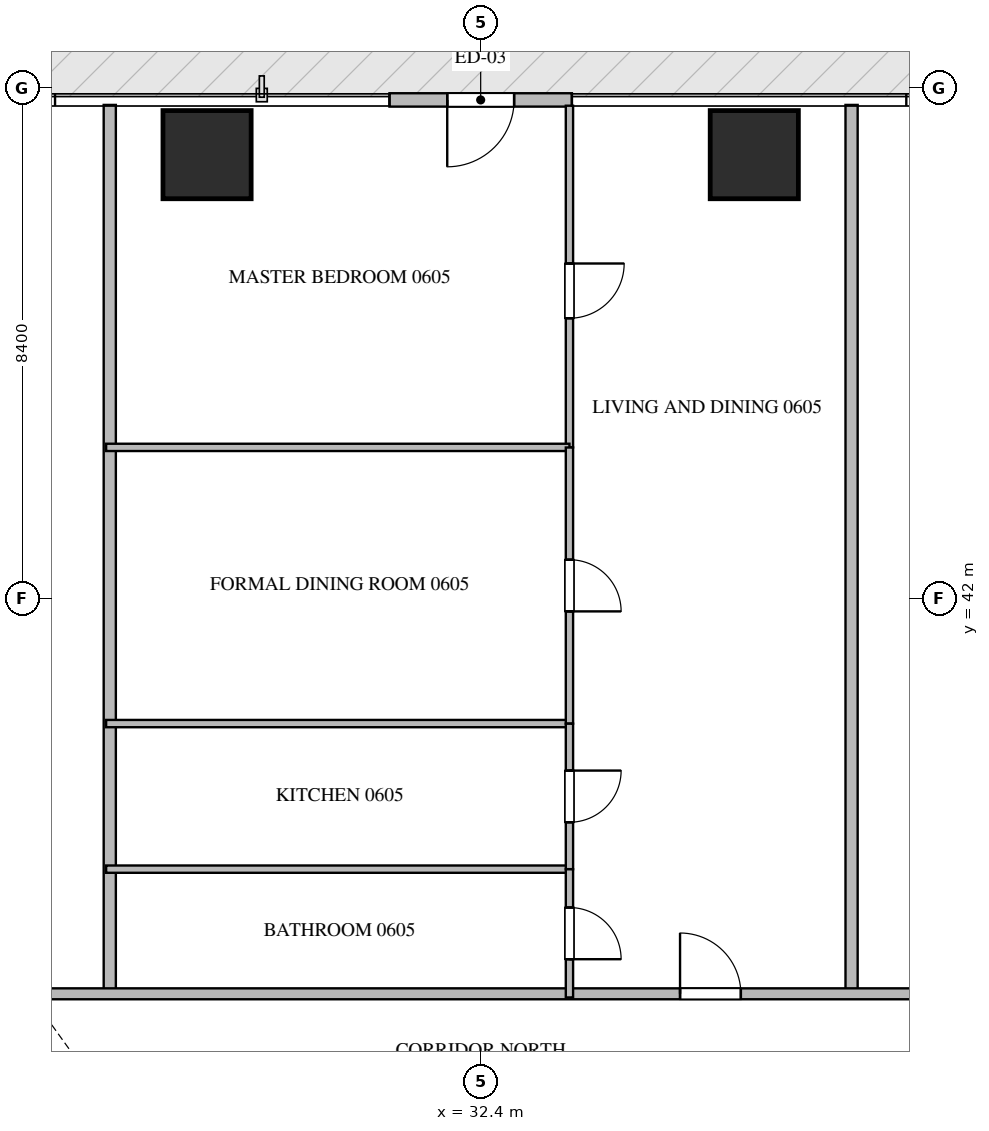
"""IFC4 building model, lengths in metres.
Left out: names, types, materials, properties, quantities, classifications, styles, units other than length and angle.
Written with IfcOpenShell. Run it as: python <this file> out.ifc"""

import sys

from ifc_helpers import new_model, si_unit, direction, frame, frame_2d, origin, origin_2d, place, context, subcontext, project, spatial, rectangle, extrude, source, transform, mapped, element, fill, save


model = new_model("IFC4")
c1 = context("Model", 3, precision=1e-05, world=origin(), true_north=direction((0.0, 1.0)))
c2 = subcontext(c1, "Body", "Model", "MODEL_VIEW")
j1 = project(units=[si_unit("LENGTHUNIT", "METRE"), si_unit("PLANEANGLEUNIT", "RADIAN")], contexts=[c1])
p1 = place(None, origin())
s1 = spatial("IfcSite", under=j1, at=p1, CompositionType="ELEMENT")
p2 = place(p1, origin())
s2 = spatial("IfcBuilding", under=s1, at=p2, CompositionType="ELEMENT")
p3 = place(p2, frame((0.0, 0.0, 30.45)))
s3 = spatial("IfcBuildingStorey", under=s2, at=p3, CompositionType="ELEMENT", Elevation=30.45)
m1 = source(origin(), c2, "Body", "SweptSolid", [
    extrude(rectangle(XDim=1.45, YDim=1.45, at=origin_2d()), origin(), (0.0, 0.0, 1.0), 3.75),
])
for number, where, z_axis, x_axis in (
    (1, (27.9, 49.3, -0.26), (0.0, 0.0, 1.0), (1.0, 0.0, 0.0)),
    (2, (36.9, 49.3, -0.26), (0.0, 0.0, 1.0), (1.0, 0.0, 0.0)),
):
    element("IfcColumn", number, at=place(p3, frame(where, z_axis=z_axis, x_axis=x_axis)), inside=s3, PredefinedType="COLUMN", context=c2, shape_type="MappedRepresentation", body=[
        mapped(m1, transform((0.0, 0.0, 0.0), scale=1.0)),
    ])
p4 = place(p3, frame((33.9, 50.2, 0.0), z_axis=(0.0, 0.0, 1.0), x_axis=(-1.0, 0.0, 0.0)))
e3 = element("IfcWall", 3, at=p4, inside=s3, PredefinedType="ELEMENTEDWALL", context=c2, shape_type="SweptSolid", body=[
    extrude(rectangle(XDim=3.0, YDim=0.22, at=frame_2d((1.5, 0.0))), origin(), (0.0, 0.0, 1.0), 3.475),
])
p5 = place(p4, frame((0.95, 0.0, 0.0)))
e4 = element("IfcOpeningElement", 4, at=p5, cuts=e3, PredefinedType="OPENING", context=c2, shape_type="SweptSolid", body=[
    extrude(rectangle(XDim=1.1, YDim=2.2, at=frame_2d((0.55, 1.1))), frame((0.0, 0.12, 0.0), z_axis=(0.0, -1.0, 0.0), x_axis=(1.0, 0.0, 0.0)), (0.0, 0.0, 1.0), 0.24),
])
for number, where, z_axis, x_axis in (
    (5, (26.3, 35.5, 0.0), (0.0, 0.0, 1.0), (0.0, 1.0, 0.0)),
    (6, (38.5, 35.5, 0.0), (0.0, 0.0, 1.0), (0.0, 1.0, 0.0)),
):
    element("IfcWall", number, at=place(p3, frame(where, z_axis=z_axis, x_axis=x_axis)), inside=s3, PredefinedType="PARTITIONING", context=c2, shape_type="SweptSolid", body=[
        extrude(rectangle(XDim=14.618, YDim=0.2, at=frame_2d((7.309, 0.0))), origin(), (0.0, 0.0, 1.0), 3.49),
    ])
p6 = place(p3, frame((21.402, 35.5, 0.0), z_axis=(0.0, 0.0, 1.0), x_axis=(1.0, 0.0, 0.0)))
e7 = element("IfcWall", 7, at=p6, inside=s3, PredefinedType="PARTITIONING", context=c2, shape_type="SweptSolid", body=[
    extrude(rectangle(XDim=21.996, YDim=0.18, at=frame_2d((10.998, 0.0))), origin(), (0.0, 0.0, 1.0), 3.49),
])
p7 = place(p6, frame((2.1, 0.0, 0.0)))
e8 = element("IfcOpeningElement", 8, at=p7, cuts=e7, PredefinedType="OPENING", context=c2, shape_type="SweptSolid", body=[
    extrude(rectangle(XDim=1.0, YDim=2.15, at=frame_2d((0.5, 1.075))), frame((0.0, 0.1, 0.0), z_axis=(0.0, -1.0, 0.0), x_axis=(1.0, 0.0, 0.0)), (0.0, 0.0, 1.0), 0.2),
])
p8 = place(p6, frame((14.277, 0.0, 0.0)))
e9 = element("IfcOpeningElement", 9, at=p8, cuts=e7, PredefinedType="OPENING", context=c2, shape_type="SweptSolid", body=[
    extrude(rectangle(XDim=1.0, YDim=2.15, at=frame_2d((0.5, 1.075))), frame((0.0, 0.1, 0.0), z_axis=(0.0, -1.0, 0.0), x_axis=(1.0, 0.0, 0.0)), (0.0, 0.0, 1.0), 0.2),
])
p9 = place(p6, frame((18.896, 0.0, 0.0)))
e10 = element("IfcOpeningElement", 10, at=p9, cuts=e7, PredefinedType="OPENING", context=c2, shape_type="SweptSolid", body=[
    extrude(rectangle(XDim=1.0, YDim=2.15, at=frame_2d((0.5, 1.075))), frame((0.0, 0.1, 0.0), z_axis=(0.0, -1.0, 0.0), x_axis=(1.0, 0.0, 0.0)), (0.0, 0.0, 1.0), 0.2),
])
p10 = place(p3, frame((33.86, 50.105, 0.0), z_axis=(0.0, 0.0, 1.0), x_axis=(0.0, -1.0, 0.0)))
e11 = element("IfcWall", 11, at=p10, inside=s3, PredefinedType="PARTITIONING", context=c2, shape_type="SweptSolid", body=[
    extrude(rectangle(XDim=5.619, YDim=0.12, at=frame_2d((2.81, 0.0))), origin(), (0.0, 0.0, 1.0), 3.49),
])
p11 = place(p10, frame((2.595, 0.0, 0.0)))
e12 = element("IfcOpeningElement", 12, at=p11, cuts=e11, PredefinedType="OPENING", context=c2, shape_type="SweptSolid", body=[
    extrude(rectangle(XDim=0.9, YDim=2.1, at=frame_2d((0.45, 1.05))), frame((0.0, 0.07, 0.0), z_axis=(0.0, -1.0, 0.0), x_axis=(1.0, 0.0, 0.0)), (0.0, 0.0, 1.0), 0.14),
])
for number, where, z_axis, x_axis in (
    (13, (26.24, 44.486, 0.0), (0.0, 0.0, 1.0), (1.0, 0.0, 0.0)),
    (14, (26.24, 39.944, 0.0), (0.0, 0.0, 1.0), (1.0, 0.0, 0.0)),
    (15, (26.24, 37.55, 0.0), (0.0, 0.0, 1.0), (1.0, 0.0, 0.0)),
):
    element("IfcWall", number, at=place(p3, frame(where, z_axis=z_axis, x_axis=x_axis)), inside=s3, PredefinedType="PARTITIONING", context=c2, shape_type="SweptSolid", body=[
        extrude(rectangle(XDim=7.62, YDim=0.12, at=frame_2d((3.81, 0.0))), origin(), (0.0, 0.0, 1.0), 3.49),
    ])
p12 = place(p3, frame((33.86, 44.484, 0.0), z_axis=(0.0, 0.0, 1.0), x_axis=(0.0, -1.0, 0.0)))
e16 = element("IfcWall", 16, at=p12, inside=s3, PredefinedType="PARTITIONING", context=c2, shape_type="SweptSolid", body=[
    extrude(rectangle(XDim=4.54, YDim=0.12, at=frame_2d((2.27, 0.0))), origin(), (0.0, 0.0, 1.0), 3.49),
])
p13 = place(p12, frame((1.845, 0.0, 0.0)))
e17 = element("IfcOpeningElement", 17, at=p13, cuts=e16, PredefinedType="OPENING", context=c2, shape_type="SweptSolid", body=[
    extrude(rectangle(XDim=0.85, YDim=2.1, at=frame_2d((0.425, 1.05))), frame((0.0, 0.07, 0.0), z_axis=(0.0, -1.0, 0.0), x_axis=(1.0, 0.0, 0.0)), (0.0, 0.0, 1.0), 0.14),
])
p14 = place(p3, frame((33.86, 39.942, 0.0), z_axis=(0.0, 0.0, 1.0), x_axis=(0.0, -1.0, 0.0)))
e18 = element("IfcWall", 18, at=p14, inside=s3, PredefinedType="PARTITIONING", context=c2, shape_type="SweptSolid", body=[
    extrude(rectangle(XDim=2.392, YDim=0.12, at=frame_2d((1.196, 0.0))), origin(), (0.0, 0.0, 1.0), 3.49),
])
p15 = place(p14, frame((0.771, 0.0, 0.0)))
e19 = element("IfcOpeningElement", 19, at=p15, cuts=e18, PredefinedType="OPENING", context=c2, shape_type="SweptSolid", body=[
    extrude(rectangle(XDim=0.85, YDim=2.1, at=frame_2d((0.425, 1.05))), frame((0.0, 0.07, 0.0), z_axis=(0.0, -1.0, 0.0), x_axis=(1.0, 0.0, 0.0)), (0.0, 0.0, 1.0), 0.14),
])
p16 = place(p3, frame((33.86, 37.548, 0.0), z_axis=(0.0, 0.0, 1.0), x_axis=(0.0, -1.0, 0.0)))
e20 = element("IfcWall", 20, at=p16, inside=s3, PredefinedType="PARTITIONING", context=c2, shape_type="SweptSolid", body=[
    extrude(rectangle(XDim=2.108, YDim=0.12, at=frame_2d((1.054, 0.0))), origin(), (0.0, 0.0, 1.0), 3.49),
])
p17 = place(p16, frame((0.629, 0.0, 0.0)))
e21 = element("IfcOpeningElement", 21, at=p17, cuts=e20, PredefinedType="OPENING", context=c2, shape_type="SweptSolid", body=[
    extrude(rectangle(XDim=0.85, YDim=2.1, at=frame_2d((0.425, 1.05))), frame((0.0, 0.07, 0.0), z_axis=(0.0, -1.0, 0.0), x_axis=(1.0, 0.0, 0.0)), (0.0, 0.0, 1.0), 0.14),
])
m2 = source(origin(), c2, "Body", "SweptSolid", [
    extrude(rectangle(XDim=1.1, YDim=2.2, at=frame_2d((0.55, 1.1))), frame((0.0, 0.025, 0.0), z_axis=(0.0, -1.0, 0.0), x_axis=(1.0, 0.0, 0.0)), (0.0, 0.0, 1.0), 0.05),
])
p18 = place(p5, origin())
e22 = element("IfcDoor", 22, at=p18, inside=s3, OperationType="SINGLE_SWING_RIGHT", PredefinedType="DOOR", context=c2, shape_type="MappedRepresentation", body=[
    mapped(m2, transform((0.0, 0.0, 0.0), scale=1.0)),
])
fill(e4, e22)
m3 = source(origin(), c2, "Body", "SweptSolid", [
    extrude(rectangle(XDim=1.0, YDim=2.15, at=frame_2d((0.5, 1.075))), frame((0.0, 0.025, 0.0), z_axis=(0.0, -1.0, 0.0), x_axis=(1.0, 0.0, 0.0)), (0.0, 0.0, 1.0), 0.05),
])
p19 = place(p8, origin())
e23 = element("IfcDoor", 23, at=p19, inside=s3, OperationType="SINGLE_SWING_LEFT", PredefinedType="DOOR", context=c2, shape_type="MappedRepresentation", body=[
    mapped(m3, transform((0.0, 0.0, 0.0), scale=1.0)),
])
fill(e9, e23)
m4 = source(origin(), c2, "Body", "SweptSolid", [
    extrude(rectangle(XDim=0.9, YDim=2.1, at=frame_2d((0.45, 1.05))), frame((0.0, 0.025, 0.0), z_axis=(0.0, -1.0, 0.0), x_axis=(1.0, 0.0, 0.0)), (0.0, 0.0, 1.0), 0.05),
])
p20 = place(p11, origin())
e24 = element("IfcDoor", 24, at=p20, inside=s3, OperationType="SINGLE_SWING_LEFT", PredefinedType="DOOR", context=c2, shape_type="MappedRepresentation", body=[
    mapped(m4, transform((0.0, 0.0, 0.0), scale=1.0)),
])
fill(e12, e24)
m5 = source(origin(), c2, "Body", "SweptSolid", [
    extrude(rectangle(XDim=0.85, YDim=2.1, at=frame_2d((0.425, 1.05))), frame((0.0, 0.025, 0.0), z_axis=(0.0, -1.0, 0.0), x_axis=(1.0, 0.0, 0.0)), (0.0, 0.0, 1.0), 0.05),
])
p21 = place(p13, origin())
e25 = element("IfcDoor", 25, at=p21, inside=s3, OperationType="SINGLE_SWING_RIGHT", PredefinedType="DOOR", context=c2, shape_type="MappedRepresentation", body=[
    mapped(m5, transform((0.0, 0.0, 0.0), scale=1.0)),
])
fill(e17, e25)
p22 = place(p15, origin())
e26 = element("IfcDoor", 26, at=p22, inside=s3, OperationType="SINGLE_SWING_LEFT", PredefinedType="DOOR", context=c2, shape_type="MappedRepresentation", body=[
    mapped(m5, transform((0.0, 0.0, 0.0), scale=1.0)),
])
fill(e19, e26)
p23 = place(p17, origin())
e27 = element("IfcDoor", 27, at=p23, inside=s3, OperationType="SINGLE_SWING_RIGHT", PredefinedType="DOOR", context=c2, shape_type="MappedRepresentation", body=[
    mapped(m5, transform((0.0, 0.0, 0.0), scale=1.0)),
])
fill(e21, e27)
save(model, sys.argv[1])
